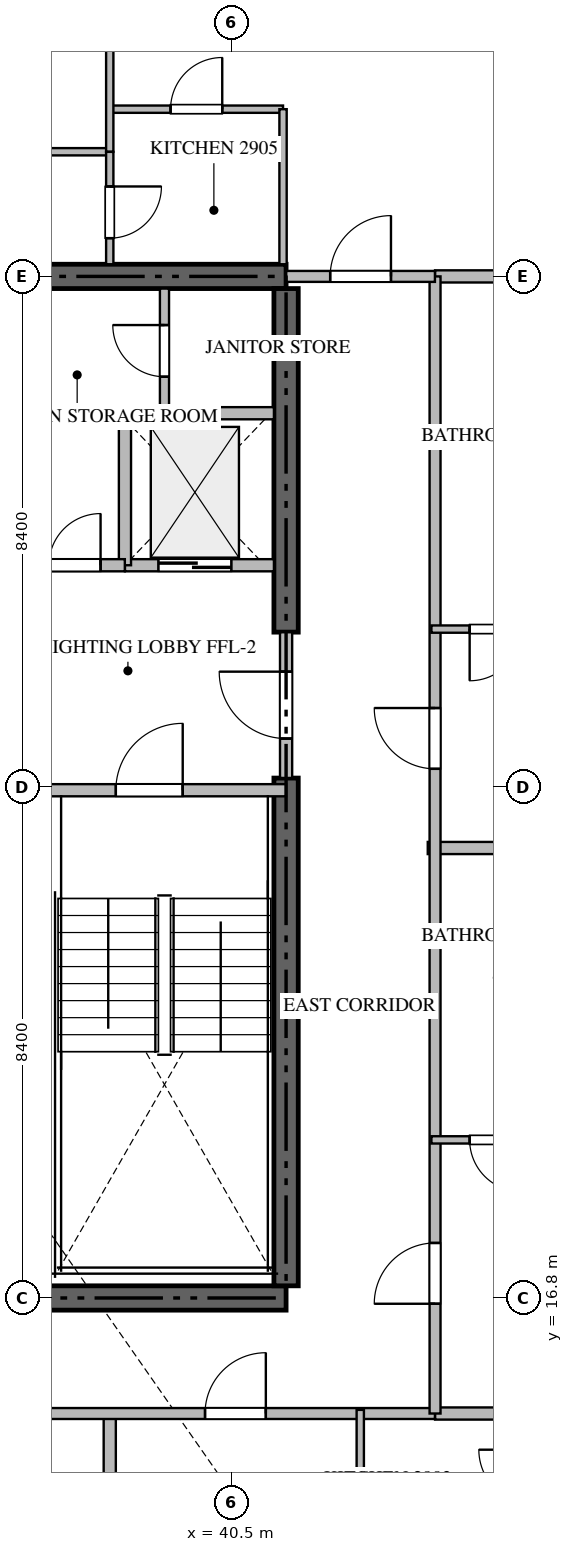
"""IFC4 building model, lengths in metres.
Left out: names, types, materials, properties, quantities, classifications, styles, units other than length and angle.
Written with IfcOpenShell. Run it as: python <this file> out.ifc"""

import sys

from ifc_helpers import new_model, si_unit, direction, frame, frame_2d, origin, place, context, subcontext, project, spatial, rectangle, extrude, source, transform, mapped, element, fill, save


model = new_model("IFC4")
c1 = context("Model", 3, precision=1e-05, world=origin(), true_north=direction((0.0, 1.0)))
c2 = subcontext(c1, "Body", "Model", "MODEL_VIEW")
j1 = project(units=[si_unit("LENGTHUNIT", "METRE"), si_unit("PLANEANGLEUNIT", "RADIAN")], contexts=[c1])
p1 = place(None, origin())
s1 = spatial("IfcSite", under=j1, at=p1, CompositionType="ELEMENT")
p2 = place(p1, origin())
s2 = spatial("IfcBuilding", under=s1, at=p2, CompositionType="ELEMENT")
p3 = place(p2, frame((0.0, 0.0, 120.15)))
s3 = spatial("IfcBuildingStorey", under=s2, at=p3, CompositionType="ELEMENT", Elevation=120.15)
for number, where, z_axis, x_axis in (
    (1, (23.4, 16.8, -0.44), (0.0, 0.0, 1.0), (1.0, 0.0, 0.0)),
    (2, (41.4, 33.6, -0.44), (0.0, 0.0, 1.0), (-1.0, 0.0, 0.0)),
):
    element("IfcWall", number, at=place(p3, frame(where, z_axis=z_axis, x_axis=x_axis)), inside=s3, PredefinedType="SHEAR", context=c2, shape_type="SweptSolid", body=[
        extrude(rectangle(XDim=18.0, YDim=0.4, at=frame_2d((9.0, 0.0))), origin(), (0.0, 0.0, 1.0), 3.928),
    ])
p4 = place(p3, frame((41.4, 17.0, -0.44), z_axis=(0.0, 0.0, 1.0), x_axis=(0.0, 1.0, 0.0)))
e3 = element("IfcWall", 3, at=p4, inside=s3, PredefinedType="SHEAR", context=c2, shape_type="SweptSolid", body=[
    extrude(rectangle(XDim=8.35, YDim=0.4, at=frame_2d((4.175, 0.0))), origin(), (0.0, 0.0, 1.0), 3.928),
])
p5 = place(p3, frame((41.4, 27.75, -0.44), z_axis=(0.0, 0.0, 1.0), x_axis=(0.0, 1.0, 0.0)))
e4 = element("IfcWall", 4, at=p5, inside=s3, PredefinedType="SHEAR", context=c2, shape_type="SweptSolid", body=[
    extrude(rectangle(XDim=5.65, YDim=0.4, at=frame_2d((2.825, 0.0))), origin(), (0.0, 0.0, 1.0), 3.928),
])
p6 = place(p3, frame((36.95, 25.15, 0.0), z_axis=(0.0, 0.0, 1.0), x_axis=(1.0, 0.0, 0.0)))
e5 = element("IfcWall", 5, at=p6, inside=s3, PredefinedType="STANDARD", context=c2, shape_type="SweptSolid", body=[
    extrude(rectangle(XDim=4.45, YDim=0.2, at=frame_2d((2.225, 0.0))), origin(), (0.0, 0.0, 1.0), 3.49),
])
p7 = place(p6, frame((1.65, 0.0, 0.0)))
e6 = element("IfcOpeningElement", 6, at=p7, cuts=e5, PredefinedType="OPENING", context=c2, shape_type="SweptSolid", body=[
    extrude(rectangle(XDim=1.1, YDim=2.15, at=frame_2d((0.55, 1.075))), frame((0.0, 0.11, 0.0), z_axis=(0.0, -1.0, 0.0), x_axis=(1.0, 0.0, 0.0)), (0.0, 0.0, 1.0), 0.22),
])
p8 = place(p3, frame((38.75, 28.85, 0.0), z_axis=(0.0, 0.0, 1.0), x_axis=(1.0, 0.0, 0.0)))
e7 = element("IfcWall", 7, at=p8, inside=s3, PredefinedType="STANDARD", context=c2, shape_type="SweptSolid", body=[
    extrude(rectangle(XDim=2.45, YDim=0.2, at=frame_2d((1.225, 0.0))), origin(), (0.0, 0.0, 1.0), 3.49),
])
p9 = place(p8, frame((0.55, 0.0, 0.0)))
e8 = element("IfcOpeningElement", 8, at=p9, cuts=e7, PredefinedType="OPENING", context=c2, shape_type="SweptSolid", body=[
    extrude(rectangle(XDim=1.2, YDim=2.2, at=frame_2d((0.6, 1.1))), frame((0.0, 0.11, 0.0), z_axis=(0.0, -1.0, 0.0), x_axis=(1.0, 0.0, 0.0)), (0.0, 0.0, 1.0), 0.22),
])
p10 = place(p3, frame((38.75, 28.85, 0.0), z_axis=(0.0, 0.0, 1.0), x_axis=(0.0, 1.0, 0.0)))
e9 = element("IfcWall", 9, at=p10, inside=s3, PredefinedType="STANDARD", context=c2, shape_type="SweptSolid", body=[
    extrude(rectangle(XDim=2.5, YDim=0.2, at=frame_2d((1.25, 0.0))), origin(), (0.0, 0.0, 1.0), 3.49),
])
p11 = place(p3, frame((38.75, 31.35, 0.0), z_axis=(0.0, 0.0, 1.0), x_axis=(1.0, 0.0, 0.0)))
e10 = element("IfcWall", 10, at=p11, inside=s3, PredefinedType="STANDARD", context=c2, shape_type="SweptSolid", body=[
    extrude(rectangle(XDim=2.45, YDim=0.2, at=frame_2d((1.225, 0.0))), origin(), (0.0, 0.0, 1.0), 3.49),
])
p12 = place(p3, frame((37.1, 28.85, 0.0), z_axis=(0.0, 0.0, 1.0), x_axis=(1.0, 0.0, 0.0)))
e11 = element("IfcWall", 11, at=p12, inside=s3, PredefinedType="STANDARD", context=c2, shape_type="SweptSolid", body=[
    extrude(rectangle(XDim=1.648, YDim=0.2, at=frame_2d((0.824, 0.0))), origin(), (0.0, 0.0, 1.0), 3.49),
])
p13 = place(p12, frame((0.399, 0.0, 0.0)))
e12 = element("IfcOpeningElement", 12, at=p13, cuts=e11, PredefinedType="OPENING", context=c2, shape_type="SweptSolid", body=[
    extrude(rectangle(XDim=0.85, YDim=2.1, at=frame_2d((0.425, 1.05))), frame((0.0, 0.11, 0.0), z_axis=(0.0, -1.0, 0.0), x_axis=(1.0, 0.0, 0.0)), (0.0, 0.0, 1.0), 0.22),
])
p14 = place(p3, frame((41.4, 25.352, 0.0), z_axis=(0.0, 0.0, 1.0), x_axis=(0.0, 1.0, 0.0)))
e13 = element("IfcWall", 13, at=p14, inside=s3, PredefinedType="STANDARD", context=c2, shape_type="SweptSolid", body=[
    extrude(rectangle(XDim=2.396, YDim=0.2, at=frame_2d((1.198, 0.0))), origin(), (0.0, 0.0, 1.0), 3.49),
])
p15 = place(p14, frame((0.648, 0.0, 0.0)))
e14 = element("IfcOpeningElement", 14, at=p15, cuts=e13, PredefinedType="OPENING", context=c2, shape_type="SweptSolid", body=[
    extrude(rectangle(XDim=1.1, YDim=2.15, at=frame_2d((0.55, 1.075))), frame((0.0, 0.11, 0.0), z_axis=(0.0, -1.0, 0.0), x_axis=(1.0, 0.0, 0.0)), (0.0, 0.0, 1.0), 0.22),
])
p16 = place(p3, frame((39.4, 31.35, 0.0), z_axis=(0.0, 0.0, 1.0), x_axis=(0.0, 1.0, 0.0)))
e15 = element("IfcWall", 15, at=p16, inside=s3, PredefinedType="PARTITIONING", context=c2, shape_type="SweptSolid", body=[
    extrude(rectangle(XDim=2.05, YDim=0.15, at=frame_2d((1.025, 0.0))), origin(), (0.0, 0.0, 1.0), 3.49),
])
p17 = place(p16, frame((0.6, 0.0, 0.0)))
e16 = element("IfcOpeningElement", 16, at=p17, cuts=e15, PredefinedType="OPENING", context=c2, shape_type="SweptSolid", body=[
    extrude(rectangle(XDim=0.85, YDim=2.1, at=frame_2d((0.425, 1.05))), frame((0.0, 0.085, 0.0), z_axis=(0.0, -1.0, 0.0), x_axis=(1.0, 0.0, 0.0)), (0.0, 0.0, 1.0), 0.17),
])
p18 = place(p3, frame((38.5, 1.482, 0.0), z_axis=(0.0, 0.0, 1.0), x_axis=(0.0, 1.0, 0.0)))
e17 = element("IfcWall", 17, at=p18, inside=s3, PredefinedType="PARTITIONING", context=c2, shape_type="SweptSolid", body=[
    extrude(rectangle(XDim=13.418, YDim=0.2, at=frame_2d((6.709, 0.0))), origin(), (0.0, 0.0, 1.0), 3.49),
])
p19 = place(p3, frame((43.73, 24.2, 0.0), z_axis=(0.0, 0.0, 1.0), x_axis=(1.0, 0.0, 0.0)))
e18 = element("IfcWall", 18, at=p19, inside=s3, PredefinedType="PARTITIONING", context=c2, shape_type="SweptSolid", body=[
    extrude(rectangle(XDim=13.188, YDim=0.2, at=frame_2d((6.594, 0.0))), origin(), (0.0, 0.0, 1.0), 3.49),
])
for number, where, z_axis, x_axis in (
    (19, (43.85, 14.9, 0.0), (0.0, 0.0, 1.0), (1.0, 0.0, 0.0)),
    (20, (43.85, 33.6, 0.0), (0.0, 0.0, 1.0), (1.0, 0.0, 0.0)),
):
    element("IfcWall", number, at=place(p3, frame(where, z_axis=z_axis, x_axis=x_axis)), inside=s3, PredefinedType="PARTITIONING", context=c2, shape_type="SweptSolid", body=[
        extrude(rectangle(XDim=13.068, YDim=0.2, at=frame_2d((6.534, 0.0))), origin(), (0.0, 0.0, 1.0), 3.49),
    ])
p20 = place(p3, frame((20.952, 14.9, 0.0), z_axis=(0.0, 0.0, 1.0), x_axis=(1.0, 0.0, 0.0)))
e21 = element("IfcWall", 21, at=p20, inside=s3, PredefinedType="PARTITIONING", context=c2, shape_type="SweptSolid", body=[
    extrude(rectangle(XDim=22.896, YDim=0.18, at=frame_2d((11.448, 0.0))), origin(), (0.0, 0.0, 1.0), 3.49),
])
p21 = place(p20, frame((2.781, 0.0, 0.0)))
e22 = element("IfcOpeningElement", 22, at=p21, cuts=e21, PredefinedType="OPENING", context=c2, shape_type="SweptSolid", body=[
    extrude(rectangle(XDim=1.0, YDim=2.15, at=frame_2d((0.5, 1.075))), frame((0.0, 0.1, 0.0), z_axis=(0.0, -1.0, 0.0), x_axis=(1.0, 0.0, 0.0)), (0.0, 0.0, 1.0), 0.2),
])
p22 = place(p20, frame((7.16, 0.0, 0.0)))
e23 = element("IfcOpeningElement", 23, at=p22, cuts=e21, PredefinedType="OPENING", context=c2, shape_type="SweptSolid", body=[
    extrude(rectangle(XDim=1.0, YDim=2.15, at=frame_2d((0.5, 1.075))), frame((0.0, 0.1, 0.0), z_axis=(0.0, -1.0, 0.0), x_axis=(1.0, 0.0, 0.0)), (0.0, 0.0, 1.0), 0.2),
])
p23 = place(p20, frame((19.115, 0.0, 0.0)))
e24 = element("IfcOpeningElement", 24, at=p23, cuts=e21, PredefinedType="OPENING", context=c2, shape_type="SweptSolid", body=[
    extrude(rectangle(XDim=1.0, YDim=2.15, at=frame_2d((0.5, 1.075))), frame((0.0, 0.1, 0.0), z_axis=(0.0, -1.0, 0.0), x_axis=(1.0, 0.0, 0.0)), (0.0, 0.0, 1.0), 0.2),
])
p24 = place(p3, frame((43.85, 14.9, 0.0), z_axis=(0.0, 0.0, 1.0), x_axis=(0.0, 1.0, 0.0)))
e25 = element("IfcWall", 25, at=p24, inside=s3, PredefinedType="PARTITIONING", context=c2, shape_type="SweptSolid", body=[
    extrude(rectangle(XDim=18.7, YDim=0.18, at=frame_2d((9.35, 0.0))), origin(), (0.0, 0.0, 1.0), 3.49),
])
p25 = place(p24, frame((1.805, 0.0, 0.0)))
e26 = element("IfcOpeningElement", 26, at=p25, cuts=e25, PredefinedType="OPENING", context=c2, shape_type="SweptSolid", body=[
    extrude(rectangle(XDim=1.0, YDim=2.15, at=frame_2d((0.5, 1.075))), frame((0.0, 0.1, 0.0), z_axis=(0.0, -1.0, 0.0), x_axis=(1.0, 0.0, 0.0)), (0.0, 0.0, 1.0), 0.2),
])
p26 = place(p24, frame((10.602, 0.0, 0.0)))
e27 = element("IfcOpeningElement", 27, at=p26, cuts=e25, PredefinedType="OPENING", context=c2, shape_type="SweptSolid", body=[
    extrude(rectangle(XDim=1.0, YDim=2.15, at=frame_2d((0.5, 1.075))), frame((0.0, 0.1, 0.0), z_axis=(0.0, -1.0, 0.0), x_axis=(1.0, 0.0, 0.0)), (0.0, 0.0, 1.0), 0.2),
])
p27 = place(p3, frame((41.402, 33.6, 0.0), z_axis=(0.0, 0.0, 1.0), x_axis=(1.0, 0.0, 0.0)))
e28 = element("IfcWall", 28, at=p27, inside=s3, PredefinedType="PARTITIONING", context=c2, shape_type="SweptSolid", body=[
    extrude(rectangle(XDim=2.446, YDim=0.18, at=frame_2d((1.223, 0.0))), origin(), (0.0, 0.0, 1.0), 3.49),
])
p28 = place(p27, frame((0.723, 0.0, 0.0)))
e29 = element("IfcOpeningElement", 29, at=p28, cuts=e28, PredefinedType="OPENING", context=c2, shape_type="SweptSolid", body=[
    extrude(rectangle(XDim=1.0, YDim=2.15, at=frame_2d((0.5, 1.075))), frame((0.0, 0.1, 0.0), z_axis=(0.0, -1.0, 0.0), x_axis=(1.0, 0.0, 0.0)), (0.0, 0.0, 1.0), 0.2),
])
p29 = place(p3, frame((42.62, 12.15, 0.0), z_axis=(0.0, 0.0, 1.0), x_axis=(0.0, 1.0, 0.0)))
e30 = element("IfcWall", 30, at=p29, inside=s3, PredefinedType="PARTITIONING", context=c2, shape_type="SweptSolid", body=[
    extrude(rectangle(XDim=2.81, YDim=0.12, at=frame_2d((1.405, 0.0))), origin(), (0.0, 0.0, 1.0), 3.49),
])
p30 = place(p3, frame((38.5, 36.35, 0.0), z_axis=(0.0, 0.0, 1.0), x_axis=(1.0, 0.0, 0.0)))
e31 = element("IfcWall", 31, at=p30, inside=s3, PredefinedType="PARTITIONING", context=c2, shape_type="SweptSolid", body=[
    extrude(rectangle(XDim=2.85, YDim=0.12, at=frame_2d((1.425, 0.0))), origin(), (0.0, 0.0, 1.0), 3.49),
])
p31 = place(p30, frame((1.0, 0.0, 0.0)))
e32 = element("IfcOpeningElement", 32, at=p31, cuts=e31, PredefinedType="OPENING", context=c2, shape_type="SweptSolid", body=[
    extrude(rectangle(XDim=0.85, YDim=2.1, at=frame_2d((0.425, 1.05))), frame((0.0, 0.07, 0.0), z_axis=(0.0, -1.0, 0.0), x_axis=(1.0, 0.0, 0.0)), (0.0, 0.0, 1.0), 0.14),
])
p32 = place(p3, frame((41.35, 36.35, 0.0), z_axis=(0.0, 0.0, 1.0), x_axis=(0.0, -1.0, 0.0)))
e33 = element("IfcWall", 33, at=p32, inside=s3, PredefinedType="PARTITIONING", context=c2, shape_type="SweptSolid", body=[
    extrude(rectangle(XDim=2.55, YDim=0.12, at=frame_2d((1.275, 0.0))), origin(), (0.0, 0.0, 1.0), 3.49),
])
p33 = place(p3, frame((32.462, 35.65, 0.0), z_axis=(0.0, 0.0, 1.0), x_axis=(1.0, 0.0, 0.0)))
e34 = element("IfcWall", 34, at=p33, inside=s3, PredefinedType="PARTITIONING", context=c2, shape_type="SweptSolid", body=[
    extrude(rectangle(XDim=6.038, YDim=0.12, at=frame_2d((3.019, 0.0))), origin(), (0.0, 0.0, 1.0), 3.49),
])
p34 = place(p3, frame((38.5, 41.963, 0.0), z_axis=(0.0, 0.0, 1.0), x_axis=(0.0, -1.0, 0.0)))
e35 = element("IfcWall", 35, at=p34, inside=s3, PredefinedType="PARTITIONING", context=c2, shape_type="SweptSolid", body=[
    extrude(rectangle(XDim=6.313, YDim=0.12, at=frame_2d((3.156, 0.0))), origin(), (0.0, 0.0, 1.0), 3.49),
])
p35 = place(p34, frame((2.732, 0.0, 0.0)))
e36 = element("IfcOpeningElement", 36, at=p35, cuts=e35, PredefinedType="OPENING", context=c2, shape_type="SweptSolid", body=[
    extrude(rectangle(XDim=0.85, YDim=2.1, at=frame_2d((0.425, 1.05))), frame((0.0, 0.07, 0.0), z_axis=(0.0, -1.0, 0.0), x_axis=(1.0, 0.0, 0.0)), (0.0, 0.0, 1.0), 0.14),
])
p36 = place(p3, frame((38.5, 35.648, 0.0), z_axis=(0.0, 0.0, 1.0), x_axis=(0.0, -1.0, 0.0)))
e37 = element("IfcWall", 37, at=p36, inside=s3, PredefinedType="PARTITIONING", context=c2, shape_type="SweptSolid", body=[
    extrude(rectangle(XDim=1.848, YDim=0.12, at=frame_2d((0.924, 0.0))), origin(), (0.0, 0.0, 1.0), 3.49),
])
p37 = place(p36, frame((0.569, 0.0, 0.0)))
e38 = element("IfcOpeningElement", 38, at=p37, cuts=e37, PredefinedType="OPENING", context=c2, shape_type="SweptSolid", body=[
    extrude(rectangle(XDim=0.85, YDim=2.1, at=frame_2d((0.425, 1.05))), frame((0.0, 0.07, 0.0), z_axis=(0.0, -1.0, 0.0), x_axis=(1.0, 0.0, 0.0)), (0.0, 0.0, 1.0), 0.14),
])
p38 = place(p3, frame((45.898, 19.4, 0.0), z_axis=(0.0, 0.0, 1.0), x_axis=(-1.0, 0.0, 0.0)))
e39 = element("IfcWall", 39, at=p38, inside=s3, PredefinedType="PARTITIONING", context=c2, shape_type="SweptSolid", body=[
    extrude(rectangle(XDim=2.108, YDim=0.12, at=frame_2d((1.054, 0.0))), origin(), (0.0, 0.0, 1.0), 3.49),
])
p39 = place(p38, frame((0.629, 0.0, 0.0)))
e40 = element("IfcOpeningElement", 40, at=p39, cuts=e39, PredefinedType="OPENING", context=c2, shape_type="SweptSolid", body=[
    extrude(rectangle(XDim=0.85, YDim=2.1, at=frame_2d((0.425, 1.05))), frame((0.0, 0.07, 0.0), z_axis=(0.0, -1.0, 0.0), x_axis=(1.0, 0.0, 0.0)), (0.0, 0.0, 1.0), 0.14),
])
p40 = place(p3, frame((45.898, 27.8, 0.0), z_axis=(0.0, 0.0, 1.0), x_axis=(-1.0, 0.0, 0.0)))
e41 = element("IfcWall", 41, at=p40, inside=s3, PredefinedType="PARTITIONING", context=c2, shape_type="SweptSolid", body=[
    extrude(rectangle(XDim=2.108, YDim=0.12, at=frame_2d((1.054, 0.0))), origin(), (0.0, 0.0, 1.0), 3.49),
])
p41 = place(p40, frame((0.629, 0.0, 0.0)))
e42 = element("IfcOpeningElement", 42, at=p41, cuts=e41, PredefinedType="OPENING", context=c2, shape_type="SweptSolid", body=[
    extrude(rectangle(XDim=0.85, YDim=2.1, at=frame_2d((0.425, 1.05))), frame((0.0, 0.07, 0.0), z_axis=(0.0, -1.0, 0.0), x_axis=(1.0, 0.0, 0.0)), (0.0, 0.0, 1.0), 0.14),
])
m1 = source(origin(), c2, "Body", "SweptSolid", [
    extrude(rectangle(XDim=1.1, YDim=2.15, at=frame_2d((0.55, 1.075))), frame((0.0, 0.025, 0.0), z_axis=(0.0, -1.0, 0.0), x_axis=(1.0, 0.0, 0.0)), (0.0, 0.0, 1.0), 0.05),
])
p42 = place(p7, origin())
e43 = element("IfcDoor", 43, at=p42, inside=s3, OperationType="SINGLE_SWING_RIGHT", PredefinedType="DOOR", context=c2, shape_type="MappedRepresentation", body=[
    mapped(m1, transform((0.0, 0.0, 0.0), scale=1.0)),
])
fill(e6, e43)
m2 = source(origin(), c2, "Body", "SweptSolid", [
    extrude(rectangle(XDim=1.2, YDim=2.2, at=frame_2d((0.6, 1.1))), frame((0.0, 0.025, 0.0), z_axis=(0.0, -1.0, 0.0), x_axis=(1.0, 0.0, 0.0)), (0.0, 0.0, 1.0), 0.05),
])
p43 = place(p9, origin())
e44 = element("IfcDoor", 44, at=p43, inside=s3, OperationType="DOUBLE_DOOR_SLIDING", PredefinedType="DOOR", context=c2, shape_type="MappedRepresentation", body=[
    mapped(m2, transform((0.0, 0.0, 0.0), scale=1.0)),
])
fill(e8, e44)
m3 = source(origin(), c2, "Body", "SweptSolid", [
    extrude(rectangle(XDim=0.85, YDim=2.1, at=frame_2d((0.425, 1.05))), frame((0.0, 0.025, 0.0), z_axis=(0.0, -1.0, 0.0), x_axis=(1.0, 0.0, 0.0)), (0.0, 0.0, 1.0), 0.05),
])
p44 = place(p13, origin())
e45 = element("IfcDoor", 45, at=p44, inside=s3, OperationType="SINGLE_SWING_RIGHT", PredefinedType="DOOR", context=c2, shape_type="MappedRepresentation", body=[
    mapped(m3, transform((0.0, 0.0, 0.0), scale=1.0)),
])
fill(e12, e45)
p45 = place(p15, origin())
e46 = element("IfcDoor", 46, at=p45, inside=s3, OperationType="SINGLE_SWING_RIGHT", PredefinedType="DOOR", context=c2, shape_type="MappedRepresentation", body=[
    mapped(m1, transform((0.0, 0.0, 0.0), scale=1.0)),
])
fill(e14, e46)
p46 = place(p17, origin())
e47 = element("IfcDoor", 47, at=p46, inside=s3, OperationType="SINGLE_SWING_RIGHT", PredefinedType="DOOR", context=c2, shape_type="MappedRepresentation", body=[
    mapped(m3, transform((0.0, 0.0, 0.0), scale=1.0)),
])
fill(e16, e47)
m4 = source(origin(), c2, "Body", "SweptSolid", [
    extrude(rectangle(XDim=1.0, YDim=2.15, at=frame_2d((0.5, 1.075))), frame((0.0, 0.025, 0.0), z_axis=(0.0, -1.0, 0.0), x_axis=(1.0, 0.0, 0.0)), (0.0, 0.0, 1.0), 0.05),
])
p47 = place(p23, origin())
e48 = element("IfcDoor", 48, at=p47, inside=s3, OperationType="SINGLE_SWING_RIGHT", PredefinedType="DOOR", context=c2, shape_type="MappedRepresentation", body=[
    mapped(m4, transform((0.0, 0.0, 0.0), scale=1.0)),
])
fill(e24, e48)
p48 = place(p25, origin())
e49 = element("IfcDoor", 49, at=p48, inside=s3, OperationType="SINGLE_SWING_LEFT", PredefinedType="DOOR", context=c2, shape_type="MappedRepresentation", body=[
    mapped(m4, transform((0.0, 0.0, 0.0), scale=1.0)),
])
fill(e26, e49)
p49 = place(p26, origin())
e50 = element("IfcDoor", 50, at=p49, inside=s3, OperationType="SINGLE_SWING_RIGHT", PredefinedType="DOOR", context=c2, shape_type="MappedRepresentation", body=[
    mapped(m4, transform((0.0, 0.0, 0.0), scale=1.0)),
])
fill(e27, e50)
p50 = place(p28, origin())
e51 = element("IfcDoor", 51, at=p50, inside=s3, OperationType="SINGLE_SWING_RIGHT", PredefinedType="DOOR", context=c2, shape_type="MappedRepresentation", body=[
    mapped(m4, transform((0.0, 0.0, 0.0), scale=1.0)),
])
fill(e29, e51)
p51 = place(p31, origin())
e52 = element("IfcDoor", 52, at=p51, inside=s3, OperationType="SINGLE_SWING_RIGHT", PredefinedType="DOOR", context=c2, shape_type="MappedRepresentation", body=[
    mapped(m3, transform((0.0, 0.0, 0.0), scale=1.0)),
])
fill(e32, e52)
p52 = place(p37, origin())
e53 = element("IfcDoor", 53, at=p52, inside=s3, OperationType="SINGLE_SWING_LEFT", PredefinedType="DOOR", context=c2, shape_type="MappedRepresentation", body=[
    mapped(m3, transform((0.0, 0.0, 0.0), scale=1.0)),
])
fill(e38, e53)
p53 = place(p39, origin())
e54 = element("IfcDoor", 54, at=p53, inside=s3, OperationType="SINGLE_SWING_LEFT", PredefinedType="DOOR", context=c2, shape_type="MappedRepresentation", body=[
    mapped(m3, transform((0.0, 0.0, 0.0), scale=1.0)),
])
fill(e40, e54)
p54 = place(p41, origin())
e55 = element("IfcDoor", 55, at=p54, inside=s3, OperationType="SINGLE_SWING_RIGHT", PredefinedType="DOOR", context=c2, shape_type="MappedRepresentation", body=[
    mapped(m3, transform((0.0, 0.0, 0.0), scale=1.0)),
])
fill(e42, e55)
save(model, sys.argv[1])
